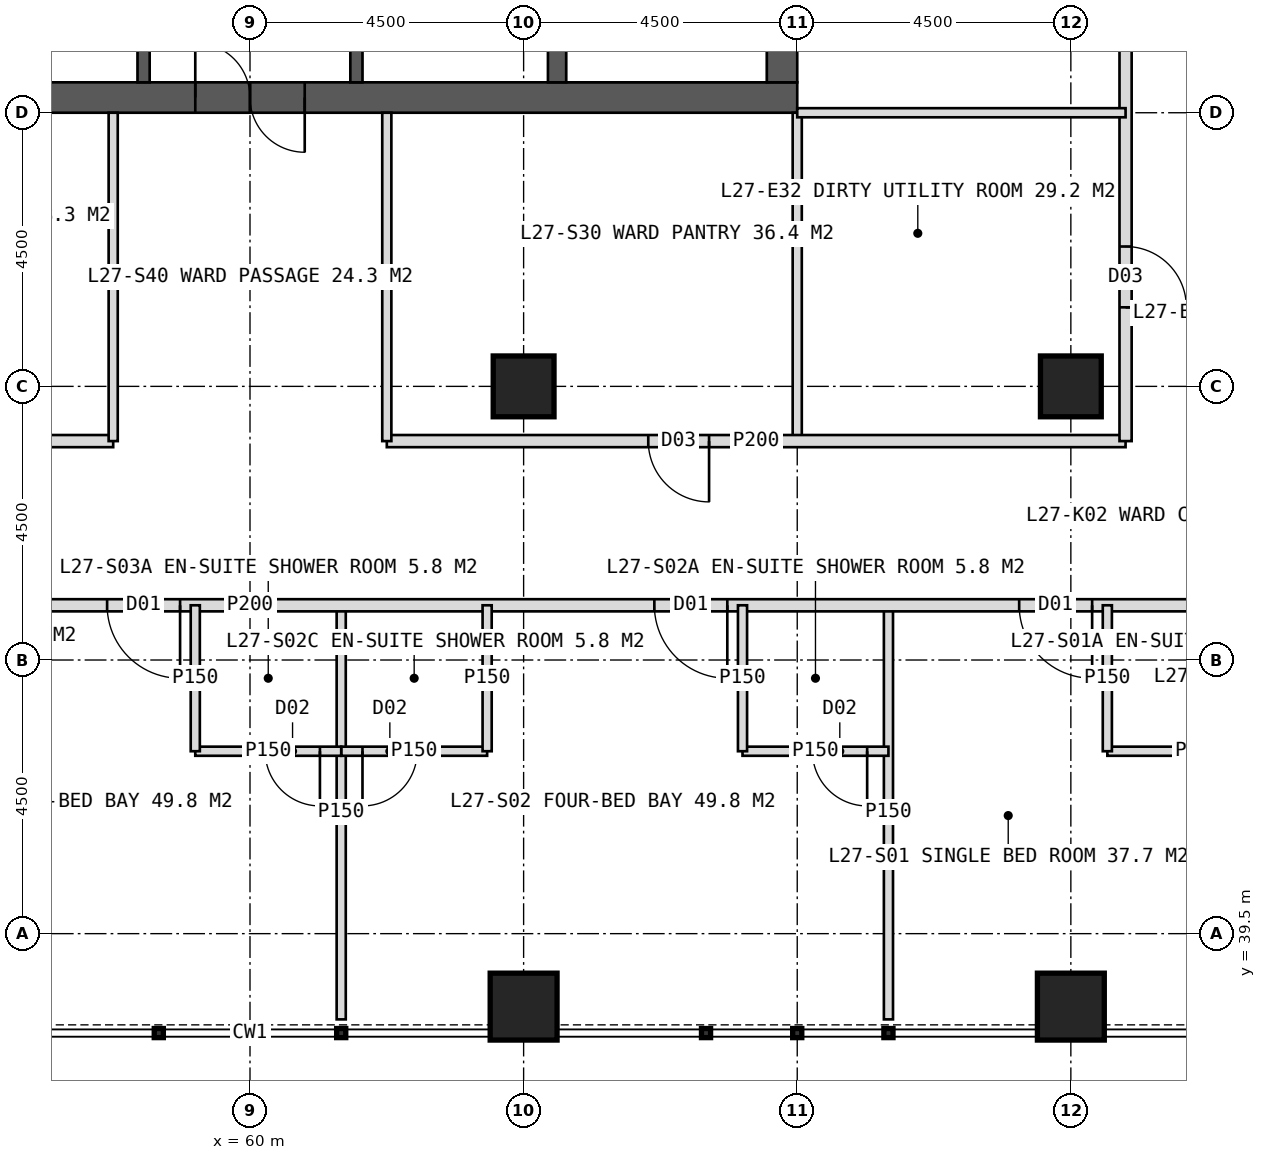
"""IFC4 building model, lengths in metres.
Left out: names, types, materials, properties, quantities, classifications, styles, units other than length and angle.
Written with IfcOpenShell. Run it as: python <this file> out.ifc"""

import sys

from ifc_helpers import new_model, si_unit, direction, frame, frame_2d, origin, origin_2d, place, context, subcontext, project, spatial, rectangle, hollow_rectangle, extrude, element, fill, save


model = new_model("IFC4")
c1 = context("Model", 3, precision=1e-05, world=origin(), true_north=direction((0.0, 1.0)))
c2 = subcontext(c1, "Body", "Model", "MODEL_VIEW")
j1 = project(units=[si_unit("LENGTHUNIT", "METRE"), si_unit("PLANEANGLEUNIT", "RADIAN")], contexts=[c1])
p1 = place(None, origin())
s1 = spatial("IfcSite", under=j1, at=p1, CompositionType="ELEMENT")
p2 = place(p1, origin())
s2 = spatial("IfcBuilding", under=s1, at=p2, CompositionType="ELEMENT")
p3 = place(p2, frame((0.0, 0.0, 116.0)))
s3 = spatial("IfcBuildingStorey", under=s2, at=p3, CompositionType="ELEMENT", Elevation=116.0)
p4 = place(p3, frame((51.0, 53.25, 0.0), z_axis=(0.0, 0.0, 1.0), x_axis=(1.0, 0.0, 0.0)))
e1 = element("IfcWall", 1, at=p4, inside=s3, PredefinedType="SHEAR", context=c2, shape_type="SweptSolid", body=[
    extrude(rectangle(XDim=18.0, YDim=0.5, at=frame_2d((9.0, 0.0))), origin(), (0.0, 0.0, 1.0), 4.0),
])
p5 = place(p4, frame((8.1, 0.0, 0.0)))
e2 = element("IfcOpeningElement", 2, at=p5, cuts=e1, PredefinedType="OPENING", context=c2, shape_type="SweptSolid", body=[
    extrude(rectangle(XDim=1.8, YDim=2.2, at=frame_2d((0.9, 1.1))), frame((0.0, 0.26, 0.0), z_axis=(0.0, -1.0, 0.0), x_axis=(1.0, 0.0, 0.0)), (0.0, 0.0, 1.0), 0.52),
])
p6 = place(p3, frame((68.75, 53.5, 0.0), z_axis=(0.0, 0.0, 1.0), x_axis=(0.0, 1.0, 0.0)))
e3 = element("IfcWall", 3, at=p6, inside=s3, PredefinedType="SHEAR", context=c2, shape_type="SweptSolid", body=[
    extrude(rectangle(XDim=17.0, YDim=0.5, at=frame_2d((8.5, 0.0))), origin(), (0.0, 0.0, 1.0), 4.0),
])
p7 = place(p6, frame((9.5, 0.0, 0.0)))
e4 = element("IfcOpeningElement", 4, at=p7, cuts=e3, PredefinedType="OPENING", context=c2, shape_type="SweptSolid", body=[
    extrude(rectangle(XDim=1.5, YDim=2.2, at=frame_2d((0.75, 1.1))), frame((0.0, 0.26, 0.0), z_axis=(0.0, -1.0, 0.0), x_axis=(1.0, 0.0, 0.0)), (0.0, 0.0, 1.0), 0.52),
])
p8 = place(p3, frame((65.05, 53.5, 0.0), z_axis=(0.0, 0.0, 1.0), x_axis=(0.0, 1.0, 0.0)))
e5 = element("IfcWall", 5, at=p8, inside=s3, PredefinedType="SHEAR", context=c2, shape_type="SweptSolid", body=[
    extrude(rectangle(XDim=17.0, YDim=0.3, at=frame_2d((8.5, 0.0))), origin(), (0.0, 0.0, 1.0), 4.0),
])
p9 = place(p3, frame((58.25, 53.5, 0.0), z_axis=(0.0, 0.0, 1.0), x_axis=(0.0, 1.0, 0.0)))
e6 = element("IfcWall", 6, at=p9, inside=s3, PredefinedType="SHEAR", context=c2, shape_type="SweptSolid", body=[
    extrude(rectangle(XDim=17.0, YDim=0.2, at=frame_2d((8.5, 0.0))), origin(), (0.0, 0.0, 1.0), 4.0),
])
p10 = place(p9, frame((1.375, 0.0, 0.0)))
e7 = element("IfcOpeningElement", 7, at=p10, cuts=e6, PredefinedType="OPENING", context=c2, shape_type="SweptSolid", body=[
    extrude(rectangle(XDim=1.4, YDim=2.2, at=frame_2d((0.7, 1.1))), frame((0.0, 0.11, 0.0), z_axis=(0.0, -1.0, 0.0), x_axis=(1.0, 0.0, 0.0)), (0.0, 0.0, 1.0), 0.22),
])
p11 = place(p9, frame((5.675, 0.0, 0.0)))
e8 = element("IfcOpeningElement", 8, at=p11, cuts=e6, PredefinedType="OPENING", context=c2, shape_type="SweptSolid", body=[
    extrude(rectangle(XDim=1.4, YDim=2.2, at=frame_2d((0.7, 1.1))), frame((0.0, 0.11, 0.0), z_axis=(0.0, -1.0, 0.0), x_axis=(1.0, 0.0, 0.0)), (0.0, 0.0, 1.0), 0.22),
])
p12 = place(p3, frame((61.75, 53.5, 0.0), z_axis=(0.0, 0.0, 1.0), x_axis=(0.0, 1.0, 0.0)))
e9 = element("IfcWall", 9, at=p12, inside=s3, PredefinedType="SHEAR", context=c2, shape_type="SweptSolid", body=[
    extrude(rectangle(XDim=17.0, YDim=0.2, at=frame_2d((8.5, 0.0))), origin(), (0.0, 0.0, 1.0), 4.0),
])
p13 = place(p12, frame((1.375, 0.0, 0.0)))
e10 = element("IfcOpeningElement", 10, at=p13, cuts=e9, PredefinedType="OPENING", context=c2, shape_type="SweptSolid", body=[
    extrude(rectangle(XDim=1.4, YDim=2.2, at=frame_2d((0.7, 1.1))), frame((0.0, 0.11, 0.0), z_axis=(0.0, -1.0, 0.0), x_axis=(1.0, 0.0, 0.0)), (0.0, 0.0, 1.0), 0.22),
])
p14 = place(p12, frame((5.675, 0.0, 0.0)))
e11 = element("IfcOpeningElement", 11, at=p14, cuts=e9, PredefinedType="OPENING", context=c2, shape_type="SweptSolid", body=[
    extrude(rectangle(XDim=1.4, YDim=2.2, at=frame_2d((0.7, 1.1))), frame((0.0, 0.11, 0.0), z_axis=(0.0, -1.0, 0.0), x_axis=(1.0, 0.0, 0.0)), (0.0, 0.0, 1.0), 0.22),
])
for number, where, z_axis, x_axis in (
    (12, (73.5, 48.5, 0.0), (0.0, 0.0, 1.0), (1.0, 0.0, 0.0)),
    (13, (64.5, 48.5, 0.0), (0.0, 0.0, 1.0), (1.0, 0.0, 0.0)),
):
    element("IfcColumn", number, at=place(p3, frame(where, z_axis=z_axis, x_axis=x_axis)), inside=s3, PredefinedType="COLUMN", context=c2, shape_type="SweptSolid", body=[
        extrude(hollow_rectangle(XDim=1.0, YDim=1.0, WallThickness=0.1, at=origin_2d()), origin(), (0.0, 0.0, 1.0), 4.0),
    ])
for number, where, z_axis, x_axis in (
    (14, (64.5, 38.3, 0.0), (0.0, 0.0, 1.0), (1.0, 0.0, 0.0)),
    (15, (73.5, 38.3, 0.0), (0.0, 0.0, 1.0), (1.0, 0.0, 0.0)),
):
    element("IfcColumn", number, at=place(p3, frame(where, z_axis=z_axis, x_axis=x_axis)), inside=s3, PredefinedType="COLUMN", context=c2, shape_type="SweptSolid", body=[
        extrude(hollow_rectangle(XDim=1.1, YDim=1.1, WallThickness=0.1, at=origin_2d()), origin(), (0.0, 0.0, 1.0), 4.0),
    ])
for number, where, z_axis, x_axis in (
    (16, (70.5, 44.9, 0.0), (0.0, 0.0, 1.0), (0.0, -1.0, 0.0)),
    (17, (61.5, 44.9, 0.0), (0.0, 0.0, 1.0), (0.0, -1.0, 0.0)),
):
    element("IfcWall", number, at=place(p3, frame(where, z_axis=z_axis, x_axis=x_axis)), inside=s3, PredefinedType="PARTITIONING", context=c2, shape_type="SweptSolid", body=[
        extrude(rectangle(XDim=6.81, YDim=0.15, at=frame_2d((3.405, 0.0))), origin(), (0.0, 0.0, 1.0), 3.75),
    ])
p15 = place(p3, frame((77.1, 44.9, 0.0), z_axis=(0.0, 0.0, 1.0), x_axis=(-1.0, 0.0, 0.0)))
e18 = element("IfcWall", 18, at=p15, inside=s3, PredefinedType="PARTITIONING", context=c2, shape_type="SweptSolid", body=[
    extrude(rectangle(XDim=34.2, YDim=0.2, at=frame_2d((17.1, 0.0))), origin(), (0.0, 0.0, 1.0), 3.75),
])
p16 = place(p15, frame((3.25, 0.0, 0.0)))
e19 = element("IfcOpeningElement", 19, at=p16, cuts=e18, PredefinedType="OPENING", context=c2, shape_type="SweptSolid", body=[
    extrude(rectangle(XDim=1.2, YDim=2.2, at=frame_2d((0.6, 1.1))), frame((0.0, 0.11, 0.0), z_axis=(0.0, -1.0, 0.0), x_axis=(1.0, 0.0, 0.0)), (0.0, 0.0, 1.0), 0.22),
])
p17 = place(p15, frame((9.25, 0.0, 0.0)))
e20 = element("IfcOpeningElement", 20, at=p17, cuts=e18, PredefinedType="OPENING", context=c2, shape_type="SweptSolid", body=[
    extrude(rectangle(XDim=1.2, YDim=2.2, at=frame_2d((0.6, 1.1))), frame((0.0, 0.11, 0.0), z_axis=(0.0, -1.0, 0.0), x_axis=(1.0, 0.0, 0.0)), (0.0, 0.0, 1.0), 0.22),
])
p18 = place(p15, frame((18.25, 0.0, 0.0)))
e21 = element("IfcOpeningElement", 21, at=p18, cuts=e18, PredefinedType="OPENING", context=c2, shape_type="SweptSolid", body=[
    extrude(rectangle(XDim=1.2, YDim=2.2, at=frame_2d((0.6, 1.1))), frame((0.0, 0.11, 0.0), z_axis=(0.0, -1.0, 0.0), x_axis=(1.0, 0.0, 0.0)), (0.0, 0.0, 1.0), 0.22),
])
p19 = place(p15, frame((27.25, 0.0, 0.0)))
e22 = element("IfcOpeningElement", 22, at=p19, cuts=e18, PredefinedType="OPENING", context=c2, shape_type="SweptSolid", body=[
    extrude(rectangle(XDim=1.2, YDim=2.2, at=frame_2d((0.6, 1.1))), frame((0.0, 0.11, 0.0), z_axis=(0.0, -1.0, 0.0), x_axis=(1.0, 0.0, 0.0)), (0.0, 0.0, 1.0), 0.22),
])
p20 = place(p3, frame((77.1, 42.5, 0.0), z_axis=(0.0, 0.0, 1.0), x_axis=(-1.0, 0.0, 0.0)))
e23 = element("IfcWall", 23, at=p20, inside=s3, PredefinedType="PARTITIONING", context=c2, shape_type="SweptSolid", body=[
    extrude(rectangle(XDim=3.0, YDim=0.15, at=frame_2d((1.5, 0.0))), origin(), (0.0, 0.0, 1.0), 3.75),
])
p21 = place(p20, frame((0.35, 0.0, 0.0)))
e24 = element("IfcOpeningElement", 24, at=p21, cuts=e23, PredefinedType="OPENING", context=c2, shape_type="SweptSolid", body=[
    extrude(rectangle(XDim=0.9, YDim=2.1, at=frame_2d((0.45, 1.05))), frame((0.0, 0.085, 0.0), z_axis=(0.0, -1.0, 0.0), x_axis=(1.0, 0.0, 0.0)), (0.0, 0.0, 1.0), 0.17),
])
p22 = place(p3, frame((74.1, 44.9, 0.0), z_axis=(0.0, 0.0, 1.0), x_axis=(0.0, -1.0, 0.0)))
e25 = element("IfcWall", 25, at=p22, inside=s3, PredefinedType="PARTITIONING", context=c2, shape_type="SweptSolid", body=[
    extrude(rectangle(XDim=2.4, YDim=0.15, at=frame_2d((1.2, 0.0))), origin(), (0.0, 0.0, 1.0), 3.75),
])
p23 = place(p3, frame((70.5, 42.5, 0.0), z_axis=(0.0, 0.0, 1.0), x_axis=(-1.0, 0.0, 0.0)))
e26 = element("IfcWall", 26, at=p23, inside=s3, PredefinedType="PARTITIONING", context=c2, shape_type="SweptSolid", body=[
    extrude(rectangle(XDim=2.4, YDim=0.15, at=frame_2d((1.2, 0.0))), origin(), (0.0, 0.0, 1.0), 3.75),
])
p24 = place(p23, frame((0.35, 0.0, 0.0)))
e27 = element("IfcOpeningElement", 27, at=p24, cuts=e26, PredefinedType="OPENING", context=c2, shape_type="SweptSolid", body=[
    extrude(rectangle(XDim=0.9, YDim=2.1, at=frame_2d((0.45, 1.05))), frame((0.0, 0.085, 0.0), z_axis=(0.0, -1.0, 0.0), x_axis=(1.0, 0.0, 0.0)), (0.0, 0.0, 1.0), 0.17),
])
p25 = place(p3, frame((68.1, 44.9, 0.0), z_axis=(0.0, 0.0, 1.0), x_axis=(0.0, -1.0, 0.0)))
e28 = element("IfcWall", 28, at=p25, inside=s3, PredefinedType="PARTITIONING", context=c2, shape_type="SweptSolid", body=[
    extrude(rectangle(XDim=2.4, YDim=0.15, at=frame_2d((1.2, 0.0))), origin(), (0.0, 0.0, 1.0), 3.75),
])
p26 = place(p3, frame((63.9, 42.5, 0.0), z_axis=(0.0, 0.0, 1.0), x_axis=(-1.0, 0.0, 0.0)))
e29 = element("IfcWall", 29, at=p26, inside=s3, PredefinedType="PARTITIONING", context=c2, shape_type="SweptSolid", body=[
    extrude(rectangle(XDim=2.4, YDim=0.15, at=frame_2d((1.2, 0.0))), origin(), (0.0, 0.0, 1.0), 3.75),
])
p27 = place(p26, frame((1.15, 0.0, 0.0)))
e30 = element("IfcOpeningElement", 30, at=p27, cuts=e29, PredefinedType="OPENING", context=c2, shape_type="SweptSolid", body=[
    extrude(rectangle(XDim=0.9, YDim=2.1, at=frame_2d((0.45, 1.05))), frame((0.0, 0.085, 0.0), z_axis=(0.0, -1.0, 0.0), x_axis=(1.0, 0.0, 0.0)), (0.0, 0.0, 1.0), 0.17),
])
p28 = place(p3, frame((63.9, 44.9, 0.0), z_axis=(0.0, 0.0, 1.0), x_axis=(0.0, -1.0, 0.0)))
e31 = element("IfcWall", 31, at=p28, inside=s3, PredefinedType="PARTITIONING", context=c2, shape_type="SweptSolid", body=[
    extrude(rectangle(XDim=2.4, YDim=0.15, at=frame_2d((1.2, 0.0))), origin(), (0.0, 0.0, 1.0), 3.75),
])
p29 = place(p3, frame((61.5, 42.5, 0.0), z_axis=(0.0, 0.0, 1.0), x_axis=(-1.0, 0.0, 0.0)))
e32 = element("IfcWall", 32, at=p29, inside=s3, PredefinedType="PARTITIONING", context=c2, shape_type="SweptSolid", body=[
    extrude(rectangle(XDim=2.4, YDim=0.15, at=frame_2d((1.2, 0.0))), origin(), (0.0, 0.0, 1.0), 3.75),
])
p30 = place(p29, frame((0.35, 0.0, 0.0)))
e33 = element("IfcOpeningElement", 33, at=p30, cuts=e32, PredefinedType="OPENING", context=c2, shape_type="SweptSolid", body=[
    extrude(rectangle(XDim=0.9, YDim=2.1, at=frame_2d((0.45, 1.05))), frame((0.0, 0.085, 0.0), z_axis=(0.0, -1.0, 0.0), x_axis=(1.0, 0.0, 0.0)), (0.0, 0.0, 1.0), 0.17),
])
p31 = place(p3, frame((59.1, 44.9, 0.0), z_axis=(0.0, 0.0, 1.0), x_axis=(0.0, -1.0, 0.0)))
e34 = element("IfcWall", 34, at=p31, inside=s3, PredefinedType="PARTITIONING", context=c2, shape_type="SweptSolid", body=[
    extrude(rectangle(XDim=2.4, YDim=0.15, at=frame_2d((1.2, 0.0))), origin(), (0.0, 0.0, 1.0), 3.75),
])
p32 = place(p3, frame((69.0, 53.0, 0.0), z_axis=(0.0, 0.0, 1.0), x_axis=(0.0, -1.0, 0.0)))
e35 = element("IfcWall", 35, at=p32, inside=s3, PredefinedType="PARTITIONING", context=c2, shape_type="SweptSolid", body=[
    extrude(rectangle(XDim=5.4, YDim=0.15, at=frame_2d((2.7, 0.0))), origin(), (0.0, 0.0, 1.0), 3.75),
])
p33 = place(p3, frame((74.4, 47.6, 0.0), z_axis=(0.0, 0.0, 1.0), x_axis=(-1.0, 0.0, 0.0)))
e36 = element("IfcWall", 36, at=p33, inside=s3, PredefinedType="PARTITIONING", context=c2, shape_type="SweptSolid", body=[
    extrude(rectangle(XDim=12.15, YDim=0.2, at=frame_2d((6.075, 0.0))), origin(), (0.0, 0.0, 1.0), 3.75),
])
p34 = place(p33, frame((6.85, 0.0, 0.0)))
e37 = element("IfcOpeningElement", 37, at=p34, cuts=e36, PredefinedType="OPENING", context=c2, shape_type="SweptSolid", body=[
    extrude(rectangle(XDim=1.0, YDim=2.1, at=frame_2d((0.5, 1.05))), frame((0.0, 0.11, 0.0), z_axis=(0.0, -1.0, 0.0), x_axis=(1.0, 0.0, 0.0)), (0.0, 0.0, 1.0), 0.22),
])
p35 = place(p3, frame((57.75, 47.6, 0.0), z_axis=(0.0, 0.0, 1.0), x_axis=(-1.0, 0.0, 0.0)))
e38 = element("IfcWall", 38, at=p35, inside=s3, PredefinedType="PARTITIONING", context=c2, shape_type="SweptSolid", body=[
    extrude(rectangle(XDim=12.15, YDim=0.2, at=frame_2d((6.075, 0.0))), origin(), (0.0, 0.0, 1.0), 3.75),
])
p36 = place(p35, frame((3.55, 0.0, 0.0)))
e39 = element("IfcOpeningElement", 39, at=p36, cuts=e38, PredefinedType="OPENING", context=c2, shape_type="SweptSolid", body=[
    extrude(rectangle(XDim=1.0, YDim=2.1, at=frame_2d((0.5, 1.05))), frame((0.0, 0.11, 0.0), z_axis=(0.0, -1.0, 0.0), x_axis=(1.0, 0.0, 0.0)), (0.0, 0.0, 1.0), 0.22),
])
p37 = place(p35, frame((8.2, 0.0, 0.0)))
e40 = element("IfcOpeningElement", 40, at=p37, cuts=e38, PredefinedType="OPENING", context=c2, shape_type="SweptSolid", body=[
    extrude(rectangle(XDim=1.0, YDim=2.1, at=frame_2d((0.5, 1.05))), frame((0.0, 0.11, 0.0), z_axis=(0.0, -1.0, 0.0), x_axis=(1.0, 0.0, 0.0)), (0.0, 0.0, 1.0), 0.22),
])
for number, where, z_axis, x_axis in (
    (41, (62.25, 53.0, 0.0), (0.0, 0.0, 1.0), (0.0, -1.0, 0.0)),
    (42, (57.75, 53.0, 0.0), (0.0, 0.0, 1.0), (0.0, -1.0, 0.0)),
):
    element("IfcWall", number, at=place(p3, frame(where, z_axis=z_axis, x_axis=x_axis)), inside=s3, PredefinedType="PARTITIONING", context=c2, shape_type="SweptSolid", body=[
        extrude(rectangle(XDim=5.4, YDim=0.15, at=frame_2d((2.7, 0.0))), origin(), (0.0, 0.0, 1.0), 3.75),
    ])
p38 = place(p3, frame((74.4, 62.0, 0.0), z_axis=(0.0, 0.0, 1.0), x_axis=(0.0, -1.0, 0.0)))
e43 = element("IfcWall", 43, at=p38, inside=s3, PredefinedType="PARTITIONING", context=c2, shape_type="SweptSolid", body=[
    extrude(rectangle(XDim=14.4, YDim=0.2, at=frame_2d((7.2, 0.0))), origin(), (0.0, 0.0, 1.0), 3.75),
])
p39 = place(p38, frame((1.45, 0.0, 0.0)))
e44 = element("IfcOpeningElement", 44, at=p39, cuts=e43, PredefinedType="OPENING", context=c2, shape_type="SweptSolid", body=[
    extrude(rectangle(XDim=1.0, YDim=2.1, at=frame_2d((0.5, 1.05))), frame((0.0, 0.11, 0.0), z_axis=(0.0, -1.0, 0.0), x_axis=(1.0, 0.0, 0.0)), (0.0, 0.0, 1.0), 0.22),
])
p40 = place(p38, frame((11.2, 0.0, 0.0)))
e45 = element("IfcOpeningElement", 45, at=p40, cuts=e43, PredefinedType="OPENING", context=c2, shape_type="SweptSolid", body=[
    extrude(rectangle(XDim=1.0, YDim=2.1, at=frame_2d((0.5, 1.05))), frame((0.0, 0.11, 0.0), z_axis=(0.0, -1.0, 0.0), x_axis=(1.0, 0.0, 0.0)), (0.0, 0.0, 1.0), 0.22),
])
p41 = place(p3, frame((69.0, 53.0, 0.0), z_axis=(0.0, 0.0, 1.0), x_axis=(1.0, 0.0, 0.0)))
e46 = element("IfcWall", 46, at=p41, inside=s3, PredefinedType="PARTITIONING", context=c2, shape_type="SweptSolid", body=[
    extrude(rectangle(XDim=5.4, YDim=0.15, at=frame_2d((2.7, 0.0))), origin(), (0.0, 0.0, 1.0), 3.75),
])
p42 = place(p16, origin())
e47 = element("IfcDoor", 47, at=p42, inside=s3, OperationType="SINGLE_SWING_LEFT", PredefinedType="DOOR", context=c2, shape_type="SweptSolid", body=[
    extrude(rectangle(XDim=1.2, YDim=2.2, at=frame_2d((0.6, 1.1))), frame((0.0, 0.025, 0.0), z_axis=(0.0, -1.0, 0.0), x_axis=(1.0, 0.0, 0.0)), (0.0, 0.0, 1.0), 0.05),
])
fill(e19, e47)
p43 = place(p17, origin())
e48 = element("IfcDoor", 48, at=p43, inside=s3, OperationType="SINGLE_SWING_LEFT", PredefinedType="DOOR", context=c2, shape_type="SweptSolid", body=[
    extrude(rectangle(XDim=1.2, YDim=2.2, at=frame_2d((0.6, 1.1))), frame((0.0, 0.025, 0.0), z_axis=(0.0, -1.0, 0.0), x_axis=(1.0, 0.0, 0.0)), (0.0, 0.0, 1.0), 0.05),
])
fill(e20, e48)
p44 = place(p24, origin())
e49 = element("IfcDoor", 49, at=p44, inside=s3, OperationType="SINGLE_SWING_LEFT", PredefinedType="DOOR", context=c2, shape_type="SweptSolid", body=[
    extrude(rectangle(XDim=0.9, YDim=2.1, at=frame_2d((0.45, 1.05))), frame((0.0, 0.025, 0.0), z_axis=(0.0, -1.0, 0.0), x_axis=(1.0, 0.0, 0.0)), (0.0, 0.0, 1.0), 0.05),
])
fill(e27, e49)
p45 = place(p27, origin())
e50 = element("IfcDoor", 50, at=p45, inside=s3, OperationType="SINGLE_SWING_RIGHT", PredefinedType="DOOR", context=c2, shape_type="SweptSolid", body=[
    extrude(rectangle(XDim=0.9, YDim=2.1, at=frame_2d((0.45, 1.05))), frame((0.0, 0.025, 0.0), z_axis=(0.0, -1.0, 0.0), x_axis=(1.0, 0.0, 0.0)), (0.0, 0.0, 1.0), 0.05),
])
fill(e30, e50)
p46 = place(p18, origin())
e51 = element("IfcDoor", 51, at=p46, inside=s3, OperationType="SINGLE_SWING_LEFT", PredefinedType="DOOR", context=c2, shape_type="SweptSolid", body=[
    extrude(rectangle(XDim=1.2, YDim=2.2, at=frame_2d((0.6, 1.1))), frame((0.0, 0.025, 0.0), z_axis=(0.0, -1.0, 0.0), x_axis=(1.0, 0.0, 0.0)), (0.0, 0.0, 1.0), 0.05),
])
fill(e21, e51)
p47 = place(p30, origin())
e52 = element("IfcDoor", 52, at=p47, inside=s3, OperationType="SINGLE_SWING_LEFT", PredefinedType="DOOR", context=c2, shape_type="SweptSolid", body=[
    extrude(rectangle(XDim=0.9, YDim=2.1, at=frame_2d((0.45, 1.05))), frame((0.0, 0.025, 0.0), z_axis=(0.0, -1.0, 0.0), x_axis=(1.0, 0.0, 0.0)), (0.0, 0.0, 1.0), 0.05),
])
fill(e33, e52)
p48 = place(p34, origin())
e53 = element("IfcDoor", 53, at=p48, inside=s3, OperationType="SINGLE_SWING_LEFT", PredefinedType="DOOR", context=c2, shape_type="SweptSolid", body=[
    extrude(rectangle(XDim=1.0, YDim=2.1, at=frame_2d((0.5, 1.05))), frame((0.0, 0.025, 0.0), z_axis=(0.0, -1.0, 0.0), x_axis=(1.0, 0.0, 0.0)), (0.0, 0.0, 1.0), 0.05),
])
fill(e37, e53)
p49 = place(p40, origin())
e54 = element("IfcDoor", 54, at=p49, inside=s3, OperationType="SINGLE_SWING_RIGHT", PredefinedType="DOOR", context=c2, shape_type="SweptSolid", body=[
    extrude(rectangle(XDim=1.0, YDim=2.1, at=frame_2d((0.5, 1.05))), frame((0.0, 0.025, 0.0), z_axis=(0.0, -1.0, 0.0), x_axis=(1.0, 0.0, 0.0)), (0.0, 0.0, 1.0), 0.05),
])
fill(e45, e54)
p50 = place(p5, origin())
e55 = element("IfcDoor", 55, at=p50, inside=s3, OperationType="DOUBLE_DOOR_SINGLE_SWING", PredefinedType="DOOR", context=c2, shape_type="SweptSolid", body=[
    extrude(rectangle(XDim=1.8, YDim=2.2, at=frame_2d((0.9, 1.1))), frame((0.0, 0.025, 0.0), z_axis=(0.0, -1.0, 0.0), x_axis=(1.0, 0.0, 0.0)), (0.0, 0.0, 1.0), 0.05),
])
fill(e2, e55)
save(model, sys.argv[1])
